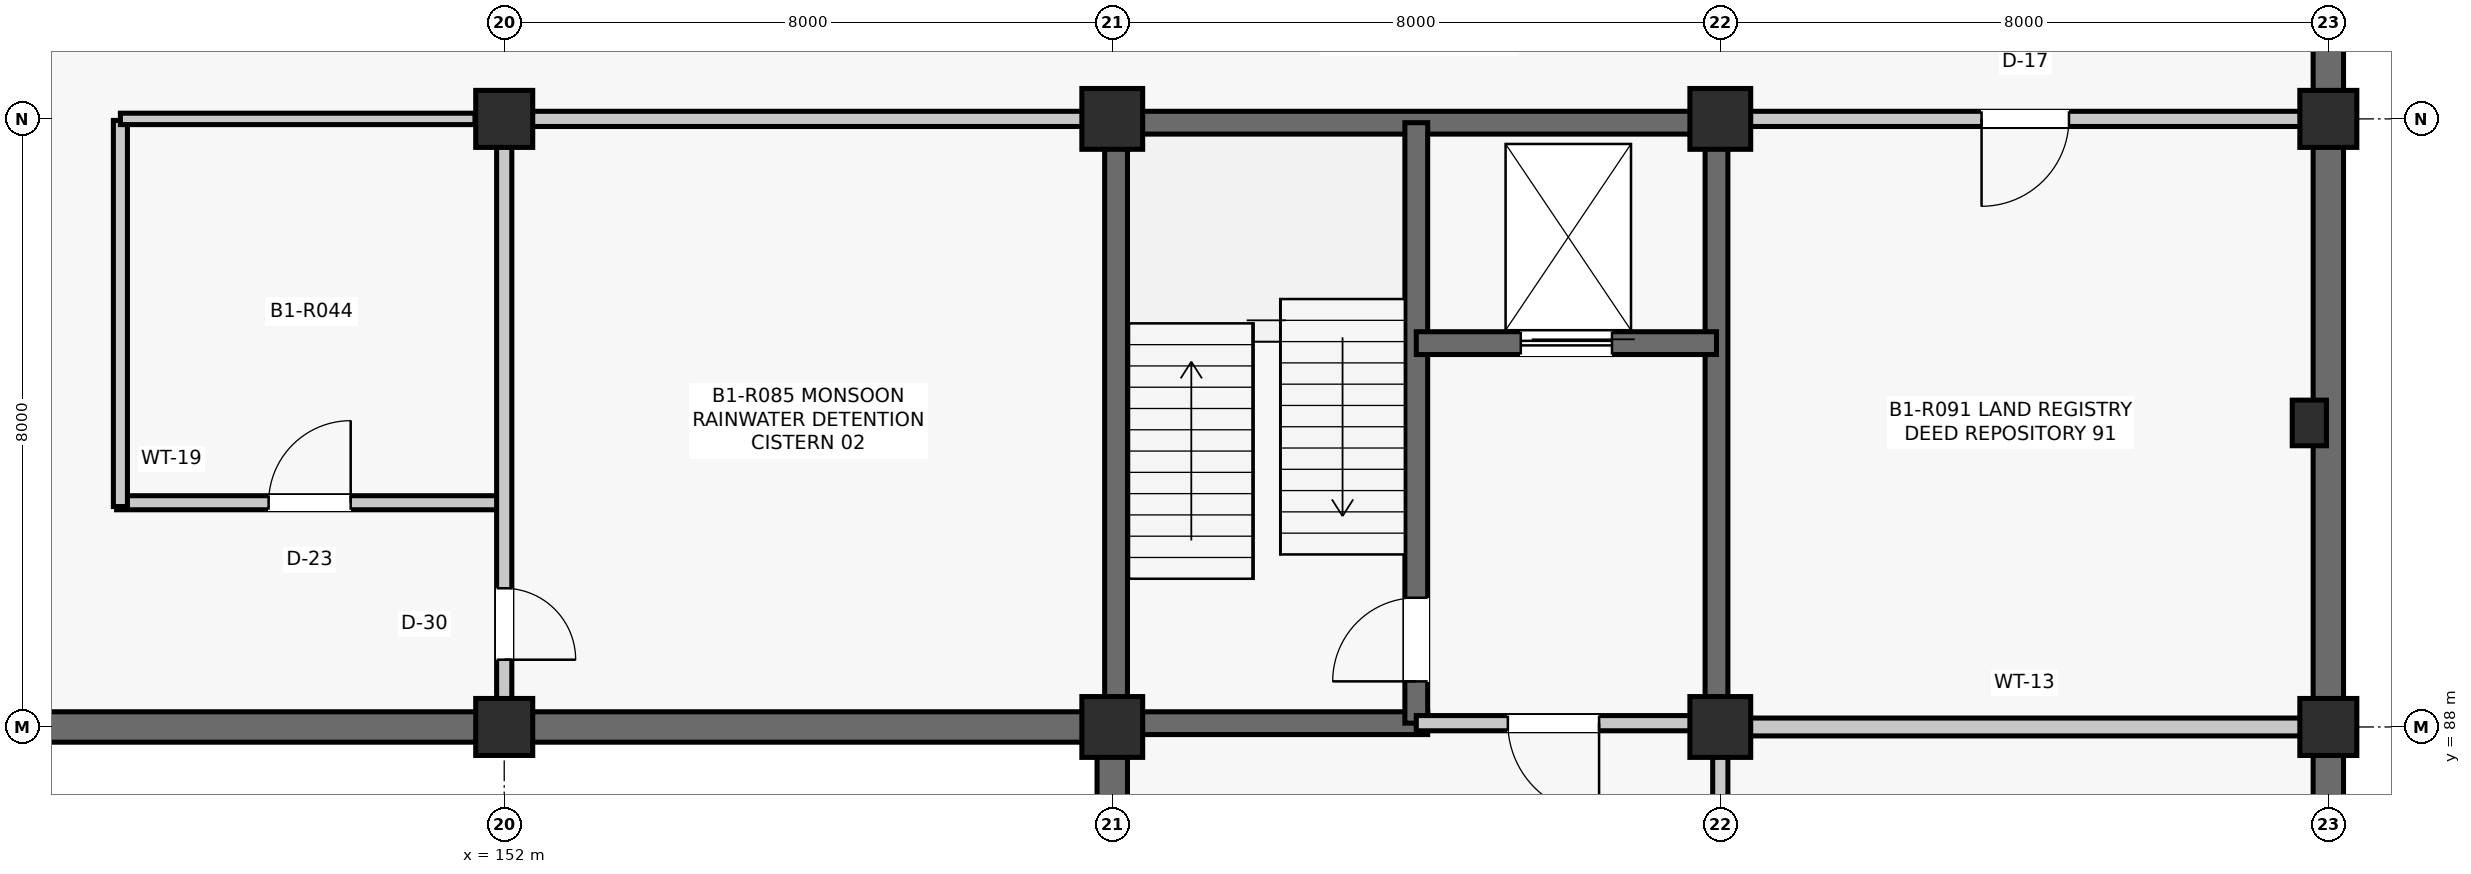
"""IFC4 building model, lengths in metres.
Left out: names, types, materials, properties, quantities, classifications, styles, units other than length and angle.
Written with IfcOpenShell. Run it as: python <this file> out.ifc"""

import sys

from ifc_helpers import new_model, si_unit, direction, frame, frame_2d, origin, origin_2d, place, context, subcontext, project, spatial, rectangle, extrude, element, fill, save


model = new_model("IFC4")
c1 = context("Model", 3, precision=1e-05, world=origin(), true_north=direction((0.0, 1.0)))
c2 = subcontext(c1, "Body", "Model", "MODEL_VIEW")
j1 = project(units=[si_unit("LENGTHUNIT", "METRE"), si_unit("PLANEANGLEUNIT", "RADIAN")], contexts=[c1])
p1 = place(None, origin())
s1 = spatial("IfcSite", under=j1, at=p1, CompositionType="ELEMENT")
p2 = place(p1, origin())
s2 = spatial("IfcBuilding", under=s1, at=p2, CompositionType="ELEMENT")
p3 = place(p2, frame((0.0, 0.0, -4.29)))
s3 = spatial("IfcBuildingStorey", under=s2, at=p3, CompositionType="ELEMENT", Elevation=-4.29)
for number, where, z_axis, x_axis in (
    (1, (152.0, 88.0, 0.0), (0.0, 0.0, 1.0), (1.0, 0.0, 0.0)),
    (2, (152.0, 96.0, 0.0), (0.0, 0.0, 1.0), (1.0, 0.0, 0.0)),
):
    element("IfcColumn", number, at=place(p3, frame(where, z_axis=z_axis, x_axis=x_axis)), inside=s3, PredefinedType="COLUMN", context=c2, shape_type="SweptSolid", body=[
        extrude(rectangle(XDim=0.75, YDim=0.75, at=origin_2d()), origin(), (0.0, 0.0, 1.0), 4.29),
    ])
for number, where, z_axis, x_axis in (
    (3, (160.0, 88.0, 0.0), (0.0, 0.0, 1.0), (1.0, 0.0, 0.0)),
    (4, (160.0, 96.0, 0.0), (0.0, 0.0, 1.0), (1.0, 0.0, 0.0)),
    (5, (168.0, 88.0, 0.0), (0.0, 0.0, 1.0), (1.0, 0.0, 0.0)),
    (6, (168.0, 96.0, 0.0), (0.0, 0.0, 1.0), (1.0, 0.0, 0.0)),
):
    element("IfcColumn", number, at=place(p3, frame(where, z_axis=z_axis, x_axis=x_axis)), inside=s3, PredefinedType="COLUMN", context=c2, shape_type="SweptSolid", body=[
        extrude(rectangle(XDim=0.8, YDim=0.8, at=origin_2d()), origin(), (0.0, 0.0, 1.0), 4.29),
    ])
for number, where, z_axis, x_axis in (
    (7, (176.0, 88.0, 0.0), (0.0, 0.0, 1.0), (1.0, 0.0, 0.0)),
    (8, (176.0, 96.0, 0.0), (0.0, 0.0, 1.0), (1.0, 0.0, 0.0)),
):
    element("IfcColumn", number, at=place(p3, frame(where, z_axis=z_axis, x_axis=x_axis)), inside=s3, PredefinedType="COLUMN", context=c2, shape_type="SweptSolid", body=[
        extrude(rectangle(XDim=0.75, YDim=0.75, at=origin_2d()), origin(), (0.0, 0.0, 1.0), 4.29),
    ])
p4 = place(p3, frame((175.75, 92.0, 0.0), z_axis=(0.0, 0.0, 1.0), x_axis=(1.0, 0.0, 0.0)))
e9 = element("IfcColumn", 9, at=p4, inside=s3, PredefinedType="PILASTER", context=c2, shape_type="SweptSolid", body=[
    extrude(rectangle(XDim=0.45, YDim=0.6, at=origin_2d()), origin(), (0.0, 0.0, 1.0), 4.29),
])
p5 = place(p3, frame((144.36, 88.0, 0.0), z_axis=(0.0, 0.0, 1.0), x_axis=(1.0, 0.0, 0.0)))
e10 = element("IfcWall", 10, at=p5, inside=s3, PredefinedType="SHEAR", context=c2, shape_type="SweptSolid", body=[
    extrude(rectangle(XDim=7.28, YDim=0.4, at=frame_2d((3.64, 0.0))), origin(), (0.0, 0.0, 1.0), 3.59),
])
p6 = place(p3, frame((152.36, 88.0, 0.0), z_axis=(0.0, 0.0, 1.0), x_axis=(1.0, 0.0, 0.0)))
e11 = element("IfcWall", 11, at=p6, inside=s3, PredefinedType="SHEAR", context=c2, shape_type="SweptSolid", body=[
    extrude(rectangle(XDim=7.255, YDim=0.4, at=frame_2d((3.627, 0.0))), origin(), (0.0, 0.0, 1.0), 3.654),
])
p7 = place(p3, frame((160.0, 80.335, 0.0), z_axis=(0.0, 0.0, 1.0), x_axis=(0.0, 1.0, 0.0)))
e12 = element("IfcWall", 12, at=p7, inside=s3, PredefinedType="SHEAR", context=c2, shape_type="SweptSolid", body=[
    extrude(rectangle(XDim=7.28, YDim=0.4, at=frame_2d((3.64, 0.0))), origin(), (0.0, 0.0, 1.0), 3.664),
])
p8 = place(p3, frame((176.0, 80.36, 0.0), z_axis=(0.0, 0.0, 1.0), x_axis=(0.0, 1.0, 0.0)))
e13 = element("IfcWall", 13, at=p8, inside=s3, PredefinedType="SHEAR", context=c2, shape_type="SweptSolid", body=[
    extrude(rectangle(XDim=7.28, YDim=0.4, at=frame_2d((3.64, 0.0))), origin(), (0.0, 0.0, 1.0), 3.667),
])
p9 = place(p3, frame((176.0, 88.36, 0.0), z_axis=(0.0, 0.0, 1.0), x_axis=(0.0, 1.0, 0.0)))
e14 = element("IfcWall", 14, at=p9, inside=s3, PredefinedType="SHEAR", context=c2, shape_type="SweptSolid", body=[
    extrude(rectangle(XDim=7.28, YDim=0.4, at=frame_2d((3.64, 0.0))), origin(), (0.0, 0.0, 1.0), 3.59),
])
p10 = place(p3, frame((176.0, 96.36, 0.0), z_axis=(0.0, 0.0, 1.0), x_axis=(0.0, 1.0, 0.0)))
e15 = element("IfcWall", 15, at=p10, inside=s3, PredefinedType="SHEAR", context=c2, shape_type="SweptSolid", body=[
    extrude(rectangle(XDim=7.28, YDim=0.4, at=frame_2d((3.64, 0.0))), origin(), (0.0, 0.0, 1.0), 3.654),
])
for number, where, z_axis, x_axis in (
    (16, (160.05, 88.29, 0.0), (0.0, 0.0, 1.0), (0.0, 1.0, 0.0)),
    (17, (160.29, 95.95, 0.0), (0.0, 0.0, 1.0), (1.0, 0.0, 0.0)),
    (18, (167.95, 88.29, 0.0), (0.0, 0.0, 1.0), (0.0, 1.0, 0.0)),
):
    element("IfcWall", number, at=place(p3, frame(where, z_axis=z_axis, x_axis=x_axis)), inside=s3, PredefinedType="SHEAR", context=c2, shape_type="SweptSolid", body=[
        extrude(rectangle(XDim=7.42, YDim=0.3, at=frame_2d((3.71, 0.0))), origin(), (0.0, 0.0, 1.0), 4.015),
    ])
p11 = place(p3, frame((160.29, 88.05, 0.0), z_axis=(0.0, 0.0, 1.0), x_axis=(1.0, 0.0, 0.0)))
e19 = element("IfcWall", 19, at=p11, inside=s3, PredefinedType="SHEAR", context=c2, shape_type="SweptSolid", body=[
    extrude(rectangle(XDim=3.86, YDim=0.3, at=frame_2d((1.93, 0.0))), origin(), (0.0, 0.0, 1.0), 4.015),
])
p12 = place(p3, frame((164.0, 88.05, 0.0), z_axis=(0.0, 0.0, 1.0), x_axis=(0.0, 1.0, 0.0)))
e20 = element("IfcWall", 20, at=p12, inside=s3, PredefinedType="SHEAR", context=c2, shape_type="SweptSolid", body=[
    extrude(rectangle(XDim=7.9, YDim=0.3, at=frame_2d((3.95, 0.0))), origin(), (0.0, 0.0, 1.0), 4.015),
])
p13 = place(p12, frame((0.55, 0.0, 0.0)))
e21 = element("IfcOpeningElement", 21, at=p13, cuts=e20, PredefinedType="OPENING", context=c2, shape_type="SweptSolid", body=[
    extrude(rectangle(XDim=1.1, YDim=2.15, at=frame_2d((0.55, 1.075))), frame((0.0, 0.16, 0.0), z_axis=(0.0, -1.0, 0.0), x_axis=(1.0, 0.0, 0.0)), (0.0, 0.0, 1.0), 0.32),
])
p14 = place(p3, frame((164.0, 93.05, 0.0), z_axis=(0.0, 0.0, 1.0), x_axis=(1.0, 0.0, 0.0)))
e22 = element("IfcWall", 22, at=p14, inside=s3, PredefinedType="SHEAR", context=c2, shape_type="SweptSolid", body=[
    extrude(rectangle(XDim=3.95, YDim=0.3, at=frame_2d((1.975, 0.0))), origin(), (0.0, 0.0, 1.0), 4.015),
])
p15 = place(p14, frame((1.375, 0.0, 0.0)))
e23 = element("IfcOpeningElement", 23, at=p15, cuts=e22, PredefinedType="OPENING", context=c2, shape_type="SweptSolid", body=[
    extrude(rectangle(XDim=1.2, YDim=2.2, at=frame_2d((0.6, 1.1))), frame((0.0, 0.16, 0.0), z_axis=(0.0, -1.0, 0.0), x_axis=(1.0, 0.0, 0.0)), (0.0, 0.0, 1.0), 0.32),
])
p16 = place(p3, frame((164.0, 88.05, 0.0), z_axis=(0.0, 0.0, 1.0), x_axis=(1.0, 0.0, 0.0)))
e24 = element("IfcWall", 24, at=p16, inside=s3, PredefinedType="PARTITIONING", context=c2, shape_type="SweptSolid", body=[
    extrude(rectangle(XDim=3.61, YDim=0.2, at=frame_2d((1.805, 0.0))), origin(), (0.0, 0.0, 1.0), 3.384),
])
p17 = place(p16, frame((1.205, 0.0, 0.0)))
e25 = element("IfcOpeningElement", 25, at=p17, cuts=e24, PredefinedType="OPENING", context=c2, shape_type="SweptSolid", body=[
    extrude(rectangle(XDim=1.2, YDim=2.15, at=frame_2d((0.6, 1.075))), frame((0.0, 0.11, 0.0), z_axis=(0.0, -1.0, 0.0), x_axis=(1.0, 0.0, 0.0)), (0.0, 0.0, 1.0), 0.22),
])
p18 = place(p3, frame((146.9, 90.95, 0.0), z_axis=(0.0, 0.0, 1.0), x_axis=(1.0, 0.0, 0.0)))
e26 = element("IfcWall", 26, at=p18, inside=s3, PredefinedType="PARTITIONING", context=c2, shape_type="SweptSolid", body=[
    extrude(rectangle(XDim=5.08, YDim=0.185, at=frame_2d((2.54, 0.0))), origin(), (0.0, 0.0, 1.0), 3.384),
])
p19 = place(p18, frame((2.0, 0.0, 0.0)))
e27 = element("IfcOpeningElement", 27, at=p19, cuts=e26, PredefinedType="OPENING", context=c2, shape_type="SweptSolid", body=[
    extrude(rectangle(XDim=1.08, YDim=2.2, at=frame_2d((0.54, 1.1))), frame((0.0, 0.103, 0.0), z_axis=(0.0, -1.0, 0.0), x_axis=(1.0, 0.0, 0.0)), (0.0, 0.0, 1.0), 0.205),
])
p20 = place(p3, frame((146.95, 90.9, 0.0), z_axis=(0.0, 0.0, 1.0), x_axis=(0.0, 1.0, 0.0)))
e28 = element("IfcWall", 28, at=p20, inside=s3, PredefinedType="PARTITIONING", context=c2, shape_type="SweptSolid", body=[
    extrude(rectangle(XDim=5.08, YDim=0.185, at=frame_2d((2.54, 0.0))), origin(), (0.0, 0.0, 1.0), 3.316),
])
p21 = place(p3, frame((146.95, 96.0, 0.0), z_axis=(0.0, 0.0, 1.0), x_axis=(1.0, 0.0, 0.0)))
e29 = element("IfcWall", 29, at=p21, inside=s3, PredefinedType="PARTITIONING", context=c2, shape_type="SweptSolid", body=[
    extrude(rectangle(XDim=4.665, YDim=0.15, at=frame_2d((2.333, 0.0))), origin(), (0.0, 0.0, 1.0), 3.316),
])
p22 = place(p3, frame((152.0, 88.365, 0.0), z_axis=(0.0, 0.0, 1.0), x_axis=(0.0, 1.0, 0.0)))
e30 = element("IfcWall", 30, at=p22, inside=s3, PredefinedType="PARTITIONING", context=c2, shape_type="SweptSolid", body=[
    extrude(rectangle(XDim=7.27, YDim=0.2, at=frame_2d((3.635, 0.0))), origin(), (0.0, 0.0, 1.0), 3.384),
])
p23 = place(p22, frame((0.52, 0.0, 0.0)))
e31 = element("IfcOpeningElement", 31, at=p23, cuts=e30, PredefinedType="OPENING", context=c2, shape_type="SweptSolid", body=[
    extrude(rectangle(XDim=0.94, YDim=2.12, at=frame_2d((0.47, 1.06))), frame((0.0, 0.11, 0.0), z_axis=(0.0, -1.0, 0.0), x_axis=(1.0, 0.0, 0.0)), (0.0, 0.0, 1.0), 0.22),
])
p24 = place(p3, frame((152.365, 96.0, 0.0), z_axis=(0.0, 0.0, 1.0), x_axis=(1.0, 0.0, 0.0)))
e32 = element("IfcWall", 32, at=p24, inside=s3, PredefinedType="PARTITIONING", context=c2, shape_type="SweptSolid", body=[
    extrude(rectangle(XDim=7.245, YDim=0.2, at=frame_2d((3.623, 0.0))), origin(), (0.0, 0.0, 1.0), 3.384),
])
p25 = place(p3, frame((168.0, 80.365, 0.0), z_axis=(0.0, 0.0, 1.0), x_axis=(0.0, 1.0, 0.0)))
e33 = element("IfcWall", 33, at=p25, inside=s3, PredefinedType="PARTITIONING", context=c2, shape_type="SweptSolid", body=[
    extrude(rectangle(XDim=7.245, YDim=0.2, at=frame_2d((3.623, 0.0))), origin(), (0.0, 0.0, 1.0), 3.461),
])
p26 = place(p25, frame((3.048, 0.0, 0.0)))
e34 = element("IfcOpeningElement", 34, at=p26, cuts=e33, PredefinedType="OPENING", context=c2, shape_type="SweptSolid", body=[
    extrude(rectangle(XDim=1.15, YDim=2.15, at=frame_2d((0.575, 1.075))), frame((0.0, 0.11, 0.0), z_axis=(0.0, -1.0, 0.0), x_axis=(1.0, 0.0, 0.0)), (0.0, 0.0, 1.0), 0.22),
])
p27 = place(p3, frame((168.39, 88.0, 0.0), z_axis=(0.0, 0.0, 1.0), x_axis=(1.0, 0.0, 0.0)))
e35 = element("IfcWall", 35, at=p27, inside=s3, PredefinedType="PARTITIONING", context=c2, shape_type="SweptSolid", body=[
    extrude(rectangle(XDim=7.245, YDim=0.235, at=frame_2d((3.623, 0.0))), origin(), (0.0, 0.0, 1.0), 3.307),
])
p28 = place(p3, frame((168.39, 96.0, 0.0), z_axis=(0.0, 0.0, 1.0), x_axis=(1.0, 0.0, 0.0)))
e36 = element("IfcWall", 36, at=p28, inside=s3, PredefinedType="PARTITIONING", context=c2, shape_type="SweptSolid", body=[
    extrude(rectangle(XDim=7.245, YDim=0.2, at=frame_2d((3.623, 0.0))), origin(), (0.0, 0.0, 1.0), 3.383),
])
p29 = place(p28, frame((3.048, 0.0, 0.0)))
e37 = element("IfcOpeningElement", 37, at=p29, cuts=e36, PredefinedType="OPENING", context=c2, shape_type="SweptSolid", body=[
    extrude(rectangle(XDim=1.15, YDim=2.15, at=frame_2d((0.575, 1.075))), frame((0.0, 0.11, 0.0), z_axis=(0.0, -1.0, 0.0), x_axis=(1.0, 0.0, 0.0)), (0.0, 0.0, 1.0), 0.22),
])
p30 = place(p13, origin())
e38 = element("IfcDoor", 38, at=p30, inside=s3, OperationType="SINGLE_SWING_LEFT", PredefinedType="DOOR", context=c2, shape_type="SweptSolid", body=[
    extrude(rectangle(XDim=1.1, YDim=2.15, at=frame_2d((0.55, 1.075))), frame((0.0, 0.025, 0.0), z_axis=(0.0, -1.0, 0.0), x_axis=(1.0, 0.0, 0.0)), (0.0, 0.0, 1.0), 0.05),
])
fill(e21, e38)
p31 = place(p15, origin())
e39 = element("IfcDoor", 39, at=p31, inside=s3, OperationType="SLIDING_TO_LEFT", PredefinedType="DOOR", context=c2, shape_type="SweptSolid", body=[
    extrude(rectangle(XDim=1.2, YDim=2.2, at=frame_2d((0.6, 1.1))), frame((0.0, 0.025, 0.0), z_axis=(0.0, -1.0, 0.0), x_axis=(1.0, 0.0, 0.0)), (0.0, 0.0, 1.0), 0.05),
])
fill(e23, e39)
p32 = place(p17, frame((1.2, 0.0, 0.0), z_axis=(0.0, 0.0, 1.0), x_axis=(-1.0, 0.0, 0.0)))
e40 = element("IfcDoor", 40, at=p32, inside=s3, OperationType="SINGLE_SWING_RIGHT", PredefinedType="DOOR", context=c2, shape_type="SweptSolid", body=[
    extrude(rectangle(XDim=1.2, YDim=2.15, at=frame_2d((0.6, 1.075))), frame((0.0, 0.025, 0.0), z_axis=(0.0, -1.0, 0.0), x_axis=(1.0, 0.0, 0.0)), (0.0, 0.0, 1.0), 0.05),
])
fill(e25, e40)
p33 = place(p19, origin())
e41 = element("IfcDoor", 41, at=p33, inside=s3, OperationType="SINGLE_SWING_RIGHT", PredefinedType="DOOR", context=c2, shape_type="SweptSolid", body=[
    extrude(rectangle(XDim=1.08, YDim=2.2, at=frame_2d((0.54, 1.1))), frame((0.0, 0.025, 0.0), z_axis=(0.0, -1.0, 0.0), x_axis=(1.0, 0.0, 0.0)), (0.0, 0.0, 1.0), 0.05),
])
fill(e27, e41)
p34 = place(p23, frame((0.94, 0.0, 0.0), z_axis=(0.0, 0.0, 1.0), x_axis=(-1.0, 0.0, 0.0)))
e42 = element("IfcDoor", 42, at=p34, inside=s3, OperationType="SINGLE_SWING_LEFT", PredefinedType="DOOR", context=c2, shape_type="SweptSolid", body=[
    extrude(rectangle(XDim=0.94, YDim=2.12, at=frame_2d((0.47, 1.06))), frame((0.0, 0.025, 0.0), z_axis=(0.0, -1.0, 0.0), x_axis=(1.0, 0.0, 0.0)), (0.0, 0.0, 1.0), 0.05),
])
fill(e31, e42)
p35 = place(p29, frame((1.15, 0.0, 0.0), z_axis=(0.0, 0.0, 1.0), x_axis=(-1.0, 0.0, 0.0)))
e43 = element("IfcDoor", 43, at=p35, inside=s3, OperationType="SINGLE_SWING_LEFT", PredefinedType="DOOR", context=c2, shape_type="SweptSolid", body=[
    extrude(rectangle(XDim=1.15, YDim=2.15, at=frame_2d((0.575, 1.075))), frame((0.0, 0.025, 0.0), z_axis=(0.0, -1.0, 0.0), x_axis=(1.0, 0.0, 0.0)), (0.0, 0.0, 1.0), 0.05),
])
fill(e37, e43)
save(model, sys.argv[1])
